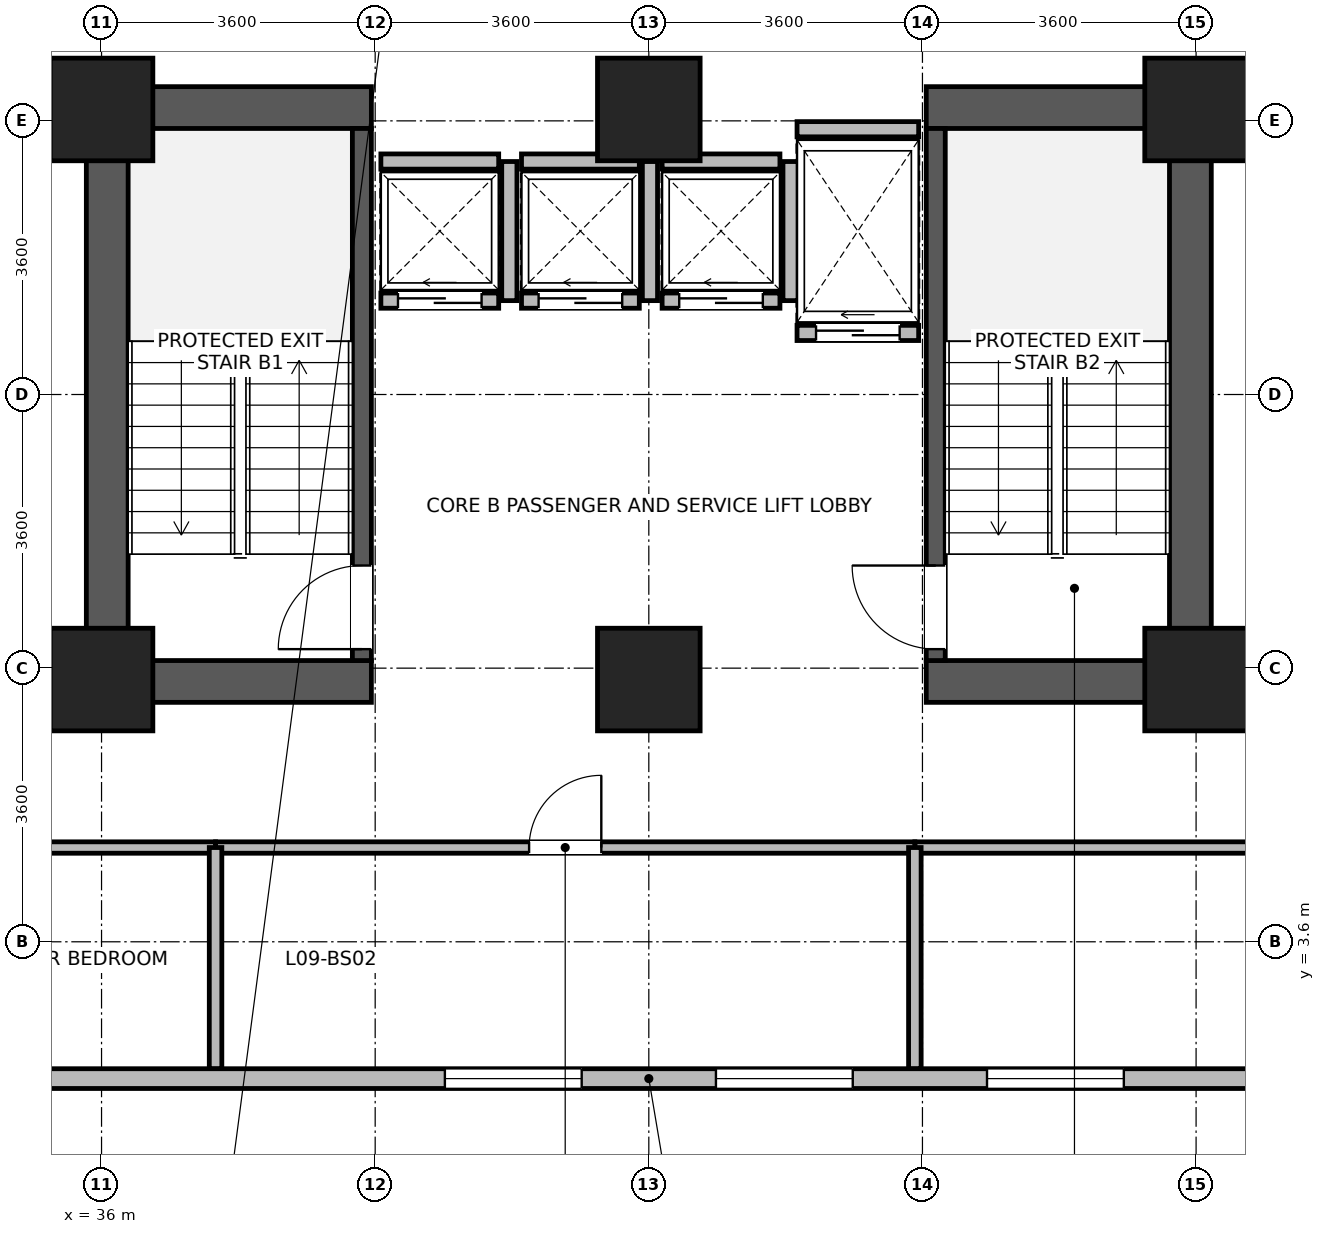
"""IFC4 building model, lengths in metres.
Left out: names, types, materials, properties, quantities, classifications, styles, units other than length and angle.
Written with IfcOpenShell. Run it as: python <this file> out.ifc"""

import sys

from ifc_helpers import new_model, si_unit, direction, frame, frame_2d, origin, origin_2d, place, context, subcontext, project, spatial, rectangle, extrude, source, transform, mapped, element, fill, save


model = new_model("IFC4")
c1 = context("Model", 3, precision=1e-05, world=origin(), true_north=direction((0.0, 1.0)))
c2 = subcontext(c1, "Body", "Model", "MODEL_VIEW")
j1 = project(units=[si_unit("LENGTHUNIT", "METRE"), si_unit("PLANEANGLEUNIT", "RADIAN")], contexts=[c1])
p1 = place(None, origin())
s1 = spatial("IfcSite", under=j1, at=p1, CompositionType="ELEMENT")
p2 = place(p1, origin())
s2 = spatial("IfcBuilding", under=s1, at=p2, CompositionType="ELEMENT")
p3 = place(p2, frame((0.0, 0.0, 40.1)))
s3 = spatial("IfcBuildingStorey", under=s2, at=p3, CompositionType="ELEMENT", Elevation=40.1)
for number, where, z_axis, x_axis in (
    (1, (36.075, 6.75, 0.0), (0.0, 0.0, 1.0), (0.0, 1.0, 0.0)),
    (2, (50.325, 6.75, 0.0), (0.0, 0.0, 1.0), (0.0, 1.0, 0.0)),
):
    element("IfcWall", number, at=place(p3, frame(where, z_axis=z_axis, x_axis=x_axis)), inside=s3, PredefinedType="SHEAR", context=c2, shape_type="SweptSolid", body=[
        extrude(rectangle(XDim=8.1, YDim=0.55, at=frame_2d((4.05, 0.0))), origin(), (0.0, 0.0, 1.0), 3.45),
    ])
for number, where, z_axis, x_axis in (
    (3, (36.35, 7.025, 0.0), (0.0, 0.0, 1.0), (1.0, 0.0, 0.0)),
    (4, (46.85, 7.025, 0.0), (0.0, 0.0, 1.0), (1.0, 0.0, 0.0)),
    (5, (36.35, 14.575, 0.0), (0.0, 0.0, 1.0), (1.0, 0.0, 0.0)),
    (6, (46.85, 14.575, 0.0), (0.0, 0.0, 1.0), (1.0, 0.0, 0.0)),
):
    element("IfcWall", number, at=place(p3, frame(where, z_axis=z_axis, x_axis=x_axis)), inside=s3, PredefinedType="SHEAR", context=c2, shape_type="SweptSolid", body=[
        extrude(rectangle(XDim=3.2, YDim=0.55, at=frame_2d((1.6, 0.0))), origin(), (0.0, 0.0, 1.0), 3.45),
    ])
p4 = place(p3, frame((39.425, 7.3, 0.0), z_axis=(0.0, 0.0, 1.0), x_axis=(0.0, 1.0, 0.0)))
e7 = element("IfcWall", 7, at=p4, inside=s3, PredefinedType="SHEAR", context=c2, shape_type="SweptSolid", body=[
    extrude(rectangle(XDim=7.0, YDim=0.25, at=frame_2d((3.5, 0.0))), origin(), (0.0, 0.0, 1.0), 3.45),
])
p5 = place(p4, frame((0.15, 0.0, 0.0)))
e8 = element("IfcOpeningElement", 8, at=p5, cuts=e7, PredefinedType="OPENING", context=c2, shape_type="SweptSolid", body=[
    extrude(rectangle(XDim=1.1, YDim=2.08, at=frame_2d((0.55, 1.04))), frame((0.0, 0.135, 0.0), z_axis=(0.0, -1.0, 0.0), x_axis=(1.0, 0.0, 0.0)), (0.0, 0.0, 1.0), 0.27),
])
p6 = place(p3, frame((46.975, 7.3, 0.0), z_axis=(0.0, 0.0, 1.0), x_axis=(0.0, 1.0, 0.0)))
e9 = element("IfcWall", 9, at=p6, inside=s3, PredefinedType="SHEAR", context=c2, shape_type="SweptSolid", body=[
    extrude(rectangle(XDim=7.0, YDim=0.25, at=frame_2d((3.5, 0.0))), origin(), (0.0, 0.0, 1.0), 3.45),
])
p7 = place(p6, frame((0.15, 0.0, 0.0)))
e10 = element("IfcOpeningElement", 10, at=p7, cuts=e9, PredefinedType="OPENING", context=c2, shape_type="SweptSolid", body=[
    extrude(rectangle(XDim=1.1, YDim=2.08, at=frame_2d((0.55, 1.04))), frame((0.0, 0.135, 0.0), z_axis=(0.0, -1.0, 0.0), x_axis=(1.0, 0.0, 0.0)), (0.0, 0.0, 1.0), 0.27),
])
m1 = source(origin(), c2, "Body", "SweptSolid", [
    extrude(rectangle(XDim=1.35, YDim=1.35, at=origin_2d()), origin(), (0.0, 0.0, 1.0), 3.7),
])
for number, where, z_axis, x_axis in (
    (11, (36.0, 7.05, 0.0), (0.0, 0.0, 1.0), (1.0, 0.0, 0.0)),
    (12, (36.0, 14.55, 0.0), (0.0, 0.0, 1.0), (1.0, 0.0, 0.0)),
    (13, (43.2, 7.05, 0.0), (0.0, 0.0, 1.0), (1.0, 0.0, 0.0)),
    (14, (43.2, 14.55, 0.0), (0.0, 0.0, 1.0), (1.0, 0.0, 0.0)),
    (15, (50.4, 7.05, 0.0), (0.0, 0.0, 1.0), (1.0, 0.0, 0.0)),
    (16, (50.4, 14.55, 0.0), (0.0, 0.0, 1.0), (1.0, 0.0, 0.0)),
):
    element("IfcColumn", number, at=place(p3, frame(where, z_axis=z_axis, x_axis=x_axis)), inside=s3, PredefinedType="COLUMN", context=c2, shape_type="MappedRepresentation", body=[
        mapped(m1, transform((0.0, 0.0, 0.0), x_axis=(1.0, 0.0, 0.0), y_axis=(0.0, 1.0, 0.0), z_axis=(0.0, 0.0, 1.0), scale=1.0)),
    ])
p8 = place(p3, frame((57.465, 1.8, 0.0), z_axis=(0.0, 0.0, 1.0), x_axis=(-1.0, 0.0, 0.0)))
e17 = element("IfcWall", 17, at=p8, inside=s3, PredefinedType="STANDARD", context=c2, shape_type="SweptSolid", body=[
    extrude(rectangle(XDim=28.53, YDim=0.26, at=frame_2d((14.265, 0.0))), origin(), (0.0, 0.0, 1.0), 3.43),
])
p9 = place(p8, frame((0.883, 0.0, 0.85)))
e18 = element("IfcOpeningElement", 18, at=p9, cuts=e17, PredefinedType="OPENING", context=c2, shape_type="SweptSolid", body=[
    extrude(rectangle(XDim=1.8, YDim=1.85, at=frame_2d((0.9, 0.925))), frame((0.0, 0.14, 0.0), z_axis=(0.0, -1.0, 0.0), x_axis=(1.0, 0.0, 0.0)), (0.0, 0.0, 1.0), 0.28),
])
p10 = place(p8, frame((4.449, 0.0, 0.85)))
e19 = element("IfcOpeningElement", 19, at=p10, cuts=e17, PredefinedType="OPENING", context=c2, shape_type="SweptSolid", body=[
    extrude(rectangle(XDim=1.8, YDim=1.85, at=frame_2d((0.9, 0.925))), frame((0.0, 0.14, 0.0), z_axis=(0.0, -1.0, 0.0), x_axis=(1.0, 0.0, 0.0)), (0.0, 0.0, 1.0), 0.28),
])
p11 = place(p8, frame((8.016, 0.0, 0.85)))
e20 = element("IfcOpeningElement", 20, at=p11, cuts=e17, PredefinedType="OPENING", context=c2, shape_type="SweptSolid", body=[
    extrude(rectangle(XDim=1.8, YDim=1.85, at=frame_2d((0.9, 0.925))), frame((0.0, 0.14, 0.0), z_axis=(0.0, -1.0, 0.0), x_axis=(1.0, 0.0, 0.0)), (0.0, 0.0, 1.0), 0.28),
])
p12 = place(p8, frame((11.582, 0.0, 0.85)))
e21 = element("IfcOpeningElement", 21, at=p12, cuts=e17, PredefinedType="OPENING", context=c2, shape_type="SweptSolid", body=[
    extrude(rectangle(XDim=1.8, YDim=1.85, at=frame_2d((0.9, 0.925))), frame((0.0, 0.14, 0.0), z_axis=(0.0, -1.0, 0.0), x_axis=(1.0, 0.0, 0.0)), (0.0, 0.0, 1.0), 0.28),
])
p13 = place(p8, frame((15.148, 0.0, 0.85)))
e22 = element("IfcOpeningElement", 22, at=p13, cuts=e17, PredefinedType="OPENING", context=c2, shape_type="SweptSolid", body=[
    extrude(rectangle(XDim=1.8, YDim=1.85, at=frame_2d((0.9, 0.925))), frame((0.0, 0.14, 0.0), z_axis=(0.0, -1.0, 0.0), x_axis=(1.0, 0.0, 0.0)), (0.0, 0.0, 1.0), 0.28),
])
p14 = place(p8, frame((22.281, 0.0, 0.85)))
e23 = element("IfcOpeningElement", 23, at=p14, cuts=e17, PredefinedType="OPENING", context=c2, shape_type="SweptSolid", body=[
    extrude(rectangle(XDim=1.8, YDim=1.85, at=frame_2d((0.9, 0.925))), frame((0.0, 0.14, 0.0), z_axis=(0.0, -1.0, 0.0), x_axis=(1.0, 0.0, 0.0)), (0.0, 0.0, 1.0), 0.28),
])
p15 = place(p8, frame((25.847, 0.0, 0.85)))
e24 = element("IfcOpeningElement", 24, at=p15, cuts=e17, PredefinedType="OPENING", context=c2, shape_type="SweptSolid", body=[
    extrude(rectangle(XDim=1.8, YDim=1.85, at=frame_2d((0.9, 0.925))), frame((0.0, 0.14, 0.0), z_axis=(0.0, -1.0, 0.0), x_axis=(1.0, 0.0, 0.0)), (0.0, 0.0, 1.0), 0.28),
])
p16 = place(p3, frame((39.675, 12.035, 0.0), z_axis=(0.0, 0.0, 1.0), x_axis=(1.0, 0.0, 0.0)))
e25 = element("IfcWall", 25, at=p16, inside=s3, PredefinedType="PARTITIONING", context=c2, shape_type="SweptSolid", body=[
    extrude(rectangle(XDim=1.55, YDim=0.2, at=frame_2d((0.775, 0.0))), origin(), (0.0, 0.0, 1.0), 3.43),
])
p17 = place(p16, frame((0.225, 0.0, 0.0)))
e26 = element("IfcOpeningElement", 26, at=p17, cuts=e25, PredefinedType="OPENING", context=c2, shape_type="SweptSolid", body=[
    extrude(rectangle(XDim=1.1, YDim=2.12, at=frame_2d((0.55, 1.06))), frame((0.0, 0.11, 0.0), z_axis=(0.0, -1.0, 0.0), x_axis=(1.0, 0.0, 0.0)), (0.0, 0.0, 1.0), 0.22),
])
p18 = place(p3, frame((39.675, 13.865, 0.0), z_axis=(0.0, 0.0, 1.0), x_axis=(1.0, 0.0, 0.0)))
e27 = element("IfcWall", 27, at=p18, inside=s3, PredefinedType="PARTITIONING", context=c2, shape_type="SweptSolid", body=[
    extrude(rectangle(XDim=1.55, YDim=0.2, at=frame_2d((0.775, 0.0))), origin(), (0.0, 0.0, 1.0), 3.43),
])
p19 = place(p3, frame((41.365, 12.035, 0.0), z_axis=(0.0, 0.0, 1.0), x_axis=(0.0, 1.0, 0.0)))
e28 = element("IfcWall", 28, at=p19, inside=s3, PredefinedType="PARTITIONING", context=c2, shape_type="SweptSolid", body=[
    extrude(rectangle(XDim=1.83, YDim=0.2, at=frame_2d((0.915, 0.0))), origin(), (0.0, 0.0, 1.0), 3.43),
])
p20 = place(p3, frame((41.525, 12.035, 0.0), z_axis=(0.0, 0.0, 1.0), x_axis=(1.0, 0.0, 0.0)))
e29 = element("IfcWall", 29, at=p20, inside=s3, PredefinedType="PARTITIONING", context=c2, shape_type="SweptSolid", body=[
    extrude(rectangle(XDim=1.55, YDim=0.2, at=frame_2d((0.775, 0.0))), origin(), (0.0, 0.0, 1.0), 3.43),
])
p21 = place(p20, frame((0.225, 0.0, 0.0)))
e30 = element("IfcOpeningElement", 30, at=p21, cuts=e29, PredefinedType="OPENING", context=c2, shape_type="SweptSolid", body=[
    extrude(rectangle(XDim=1.1, YDim=2.12, at=frame_2d((0.55, 1.06))), frame((0.0, 0.11, 0.0), z_axis=(0.0, -1.0, 0.0), x_axis=(1.0, 0.0, 0.0)), (0.0, 0.0, 1.0), 0.22),
])
p22 = place(p3, frame((41.525, 13.865, 0.0), z_axis=(0.0, 0.0, 1.0), x_axis=(1.0, 0.0, 0.0)))
e31 = element("IfcWall", 31, at=p22, inside=s3, PredefinedType="PARTITIONING", context=c2, shape_type="SweptSolid", body=[
    extrude(rectangle(XDim=1.55, YDim=0.2, at=frame_2d((0.775, 0.0))), origin(), (0.0, 0.0, 1.0), 3.43),
])
p23 = place(p3, frame((43.215, 12.035, 0.0), z_axis=(0.0, 0.0, 1.0), x_axis=(0.0, 1.0, 0.0)))
e32 = element("IfcWall", 32, at=p23, inside=s3, PredefinedType="PARTITIONING", context=c2, shape_type="SweptSolid", body=[
    extrude(rectangle(XDim=1.83, YDim=0.2, at=frame_2d((0.915, 0.0))), origin(), (0.0, 0.0, 1.0), 3.43),
])
p24 = place(p3, frame((43.375, 12.035, 0.0), z_axis=(0.0, 0.0, 1.0), x_axis=(1.0, 0.0, 0.0)))
e33 = element("IfcWall", 33, at=p24, inside=s3, PredefinedType="PARTITIONING", context=c2, shape_type="SweptSolid", body=[
    extrude(rectangle(XDim=1.55, YDim=0.2, at=frame_2d((0.775, 0.0))), origin(), (0.0, 0.0, 1.0), 3.43),
])
p25 = place(p24, frame((0.225, 0.0, 0.0)))
e34 = element("IfcOpeningElement", 34, at=p25, cuts=e33, PredefinedType="OPENING", context=c2, shape_type="SweptSolid", body=[
    extrude(rectangle(XDim=1.1, YDim=2.12, at=frame_2d((0.55, 1.06))), frame((0.0, 0.11, 0.0), z_axis=(0.0, -1.0, 0.0), x_axis=(1.0, 0.0, 0.0)), (0.0, 0.0, 1.0), 0.22),
])
p26 = place(p3, frame((43.375, 13.865, 0.0), z_axis=(0.0, 0.0, 1.0), x_axis=(1.0, 0.0, 0.0)))
e35 = element("IfcWall", 35, at=p26, inside=s3, PredefinedType="PARTITIONING", context=c2, shape_type="SweptSolid", body=[
    extrude(rectangle(XDim=1.55, YDim=0.2, at=frame_2d((0.775, 0.0))), origin(), (0.0, 0.0, 1.0), 3.43),
])
p27 = place(p3, frame((45.065, 12.035, 0.0), z_axis=(0.0, 0.0, 1.0), x_axis=(0.0, 1.0, 0.0)))
e36 = element("IfcWall", 36, at=p27, inside=s3, PredefinedType="PARTITIONING", context=c2, shape_type="SweptSolid", body=[
    extrude(rectangle(XDim=1.83, YDim=0.2, at=frame_2d((0.915, 0.0))), origin(), (0.0, 0.0, 1.0), 3.43),
])
p28 = place(p3, frame((45.15, 11.61, 0.0), z_axis=(0.0, 0.0, 1.0), x_axis=(1.0, 0.0, 0.0)))
e37 = element("IfcWall", 37, at=p28, inside=s3, PredefinedType="PARTITIONING", context=c2, shape_type="SweptSolid", body=[
    extrude(rectangle(XDim=1.6, YDim=0.2, at=frame_2d((0.8, 0.0))), origin(), (0.0, 0.0, 1.0), 3.43),
])
p29 = place(p28, frame((0.25, 0.0, 0.0)))
e38 = element("IfcOpeningElement", 38, at=p29, cuts=e37, PredefinedType="OPENING", context=c2, shape_type="SweptSolid", body=[
    extrude(rectangle(XDim=1.1, YDim=2.12, at=frame_2d((0.55, 1.06))), frame((0.0, 0.11, 0.0), z_axis=(0.0, -1.0, 0.0), x_axis=(1.0, 0.0, 0.0)), (0.0, 0.0, 1.0), 0.22),
])
p30 = place(p3, frame((45.15, 14.29, 0.0), z_axis=(0.0, 0.0, 1.0), x_axis=(1.0, 0.0, 0.0)))
e39 = element("IfcWall", 39, at=p30, inside=s3, PredefinedType="PARTITIONING", context=c2, shape_type="SweptSolid", body=[
    extrude(rectangle(XDim=1.6, YDim=0.2, at=frame_2d((0.8, 0.0))), origin(), (0.0, 0.0, 1.0), 2.23),
])
p31 = place(p3, frame((46.7, 4.84, 0.0), z_axis=(0.0, 0.0, 1.0), x_axis=(1.0, 0.0, 0.0)))
e40 = element("IfcWall", 40, at=p31, inside=s3, PredefinedType="PARTITIONING", context=c2, shape_type="SweptSolid", body=[
    extrude(rectangle(XDim=10.768, YDim=0.15, at=frame_2d((5.384, 0.0))), origin(), (0.0, 0.0, 1.0), 3.43),
])
p32 = place(p31, frame((4.734, 0.0, 0.0)))
e41 = element("IfcOpeningElement", 41, at=p32, cuts=e40, PredefinedType="OPENING", context=c2, shape_type="SweptSolid", body=[
    extrude(rectangle(XDim=1.3, YDim=2.12, at=frame_2d((0.65, 1.06))), frame((0.0, 0.085, 0.0), z_axis=(0.0, -1.0, 0.0), x_axis=(1.0, 0.0, 0.0)), (0.0, 0.0, 1.0), 0.17),
])
p33 = place(p3, frame((37.5, 4.84, 0.0), z_axis=(0.0, 0.0, 1.0), x_axis=(1.0, 0.0, 0.0)))
e42 = element("IfcWall", 42, at=p33, inside=s3, PredefinedType="PARTITIONING", context=c2, shape_type="SweptSolid", body=[
    extrude(rectangle(XDim=9.2, YDim=0.15, at=frame_2d((4.6, 0.0))), origin(), (0.0, 0.0, 1.0), 3.43),
])
p34 = place(p33, frame((4.125, 0.0, 0.0)))
e43 = element("IfcOpeningElement", 43, at=p34, cuts=e42, PredefinedType="OPENING", context=c2, shape_type="SweptSolid", body=[
    extrude(rectangle(XDim=0.95, YDim=2.1, at=frame_2d((0.475, 1.05))), frame((0.0, 0.085, 0.0), z_axis=(0.0, -1.0, 0.0), x_axis=(1.0, 0.0, 0.0)), (0.0, 0.0, 1.0), 0.17),
])
p35 = place(p3, frame((28.932, 4.84, 0.0), z_axis=(0.0, 0.0, 1.0), x_axis=(1.0, 0.0, 0.0)))
e44 = element("IfcWall", 44, at=p35, inside=s3, PredefinedType="PARTITIONING", context=c2, shape_type="SweptSolid", body=[
    extrude(rectangle(XDim=8.568, YDim=0.15, at=frame_2d((4.284, 0.0))), origin(), (0.0, 0.0, 1.0), 3.43),
])
p36 = place(p35, frame((3.809, 0.0, 0.0)))
e45 = element("IfcOpeningElement", 45, at=p36, cuts=e44, PredefinedType="OPENING", context=c2, shape_type="SweptSolid", body=[
    extrude(rectangle(XDim=0.95, YDim=2.1, at=frame_2d((0.475, 1.05))), frame((0.0, 0.085, 0.0), z_axis=(0.0, -1.0, 0.0), x_axis=(1.0, 0.0, 0.0)), (0.0, 0.0, 1.0), 0.17),
])
for number, where, z_axis, x_axis in (
    (46, (37.5, 1.932, 0.0), (0.0, 0.0, 1.0), (0.0, 1.0, 0.0)),
    (47, (46.7, 1.932, 0.0), (0.0, 0.0, 1.0), (0.0, 1.0, 0.0)),
):
    element("IfcWall", number, at=place(p3, frame(where, z_axis=z_axis, x_axis=x_axis)), inside=s3, PredefinedType="PARTITIONING", context=c2, shape_type="SweptSolid", body=[
        extrude(rectangle(XDim=2.908, YDim=0.165, at=frame_2d((1.454, 0.0))), origin(), (0.0, 0.0, 1.0), 3.43),
    ])
p37 = place(p11, origin())
e48 = element("IfcWindow", 48, at=p37, inside=s3, PartitioningType="SINGLE_PANEL", PredefinedType="WINDOW", context=c2, shape_type="SweptSolid", body=[
    extrude(rectangle(XDim=1.8, YDim=1.85, at=frame_2d((0.9, 0.925))), frame((0.0, 0.03, 0.0), z_axis=(0.0, -1.0, 0.0), x_axis=(1.0, 0.0, 0.0)), (0.0, 0.0, 1.0), 0.06),
])
fill(e20, e48)
p38 = place(p12, origin())
e49 = element("IfcWindow", 49, at=p38, inside=s3, PartitioningType="SINGLE_PANEL", PredefinedType="WINDOW", context=c2, shape_type="SweptSolid", body=[
    extrude(rectangle(XDim=1.8, YDim=1.85, at=frame_2d((0.9, 0.925))), frame((0.0, 0.03, 0.0), z_axis=(0.0, -1.0, 0.0), x_axis=(1.0, 0.0, 0.0)), (0.0, 0.0, 1.0), 0.06),
])
fill(e21, e49)
p39 = place(p13, origin())
e50 = element("IfcWindow", 50, at=p39, inside=s3, PartitioningType="SINGLE_PANEL", PredefinedType="WINDOW", context=c2, shape_type="SweptSolid", body=[
    extrude(rectangle(XDim=1.8, YDim=1.85, at=frame_2d((0.9, 0.925))), frame((0.0, 0.03, 0.0), z_axis=(0.0, -1.0, 0.0), x_axis=(1.0, 0.0, 0.0)), (0.0, 0.0, 1.0), 0.06),
])
fill(e22, e50)
p40 = place(p5, origin())
e51 = element("IfcDoor", 51, at=p40, inside=s3, OperationType="SINGLE_SWING_LEFT", PredefinedType="DOOR", context=c2, shape_type="SweptSolid", body=[
    extrude(rectangle(XDim=1.1, YDim=2.08, at=frame_2d((0.55, 1.04))), frame((0.0, 0.025, 0.0), z_axis=(0.0, -1.0, 0.0), x_axis=(1.0, 0.0, 0.0)), (0.0, 0.0, 1.0), 0.05),
])
fill(e8, e51)
p41 = place(p7, origin())
e52 = element("IfcDoor", 52, at=p41, inside=s3, OperationType="SINGLE_SWING_RIGHT", PredefinedType="DOOR", context=c2, shape_type="SweptSolid", body=[
    extrude(rectangle(XDim=1.1, YDim=2.08, at=frame_2d((0.55, 1.04))), frame((0.0, 0.025, 0.0), z_axis=(0.0, -1.0, 0.0), x_axis=(1.0, 0.0, 0.0)), (0.0, 0.0, 1.0), 0.05),
])
fill(e10, e52)
p42 = place(p17, origin())
e53 = element("IfcDoor", 53, at=p42, inside=s3, OperationType="SLIDING_TO_LEFT", PredefinedType="DOOR", context=c2, shape_type="SweptSolid", body=[
    extrude(rectangle(XDim=1.1, YDim=2.12, at=frame_2d((0.55, 1.06))), frame((0.0, 0.025, 0.0), z_axis=(0.0, -1.0, 0.0), x_axis=(1.0, 0.0, 0.0)), (0.0, 0.0, 1.0), 0.05),
])
fill(e26, e53)
p43 = place(p21, origin())
e54 = element("IfcDoor", 54, at=p43, inside=s3, OperationType="SLIDING_TO_LEFT", PredefinedType="DOOR", context=c2, shape_type="SweptSolid", body=[
    extrude(rectangle(XDim=1.1, YDim=2.12, at=frame_2d((0.55, 1.06))), frame((0.0, 0.025, 0.0), z_axis=(0.0, -1.0, 0.0), x_axis=(1.0, 0.0, 0.0)), (0.0, 0.0, 1.0), 0.05),
])
fill(e30, e54)
p44 = place(p25, origin())
e55 = element("IfcDoor", 55, at=p44, inside=s3, OperationType="SLIDING_TO_LEFT", PredefinedType="DOOR", context=c2, shape_type="SweptSolid", body=[
    extrude(rectangle(XDim=1.1, YDim=2.12, at=frame_2d((0.55, 1.06))), frame((0.0, 0.025, 0.0), z_axis=(0.0, -1.0, 0.0), x_axis=(1.0, 0.0, 0.0)), (0.0, 0.0, 1.0), 0.05),
])
fill(e34, e55)
p45 = place(p29, origin())
e56 = element("IfcDoor", 56, at=p45, inside=s3, OperationType="SLIDING_TO_LEFT", PredefinedType="DOOR", context=c2, shape_type="SweptSolid", body=[
    extrude(rectangle(XDim=1.1, YDim=2.12, at=frame_2d((0.55, 1.06))), frame((0.0, 0.025, 0.0), z_axis=(0.0, -1.0, 0.0), x_axis=(1.0, 0.0, 0.0)), (0.0, 0.0, 1.0), 0.05),
])
fill(e38, e56)
p46 = place(p34, origin())
e57 = element("IfcDoor", 57, at=p46, inside=s3, OperationType="SINGLE_SWING_RIGHT", PredefinedType="DOOR", context=c2, shape_type="SweptSolid", body=[
    extrude(rectangle(XDim=0.95, YDim=2.1, at=frame_2d((0.475, 1.05))), frame((0.0, 0.025, 0.0), z_axis=(0.0, -1.0, 0.0), x_axis=(1.0, 0.0, 0.0)), (0.0, 0.0, 1.0), 0.05),
])
fill(e43, e57)
save(model, sys.argv[1])
